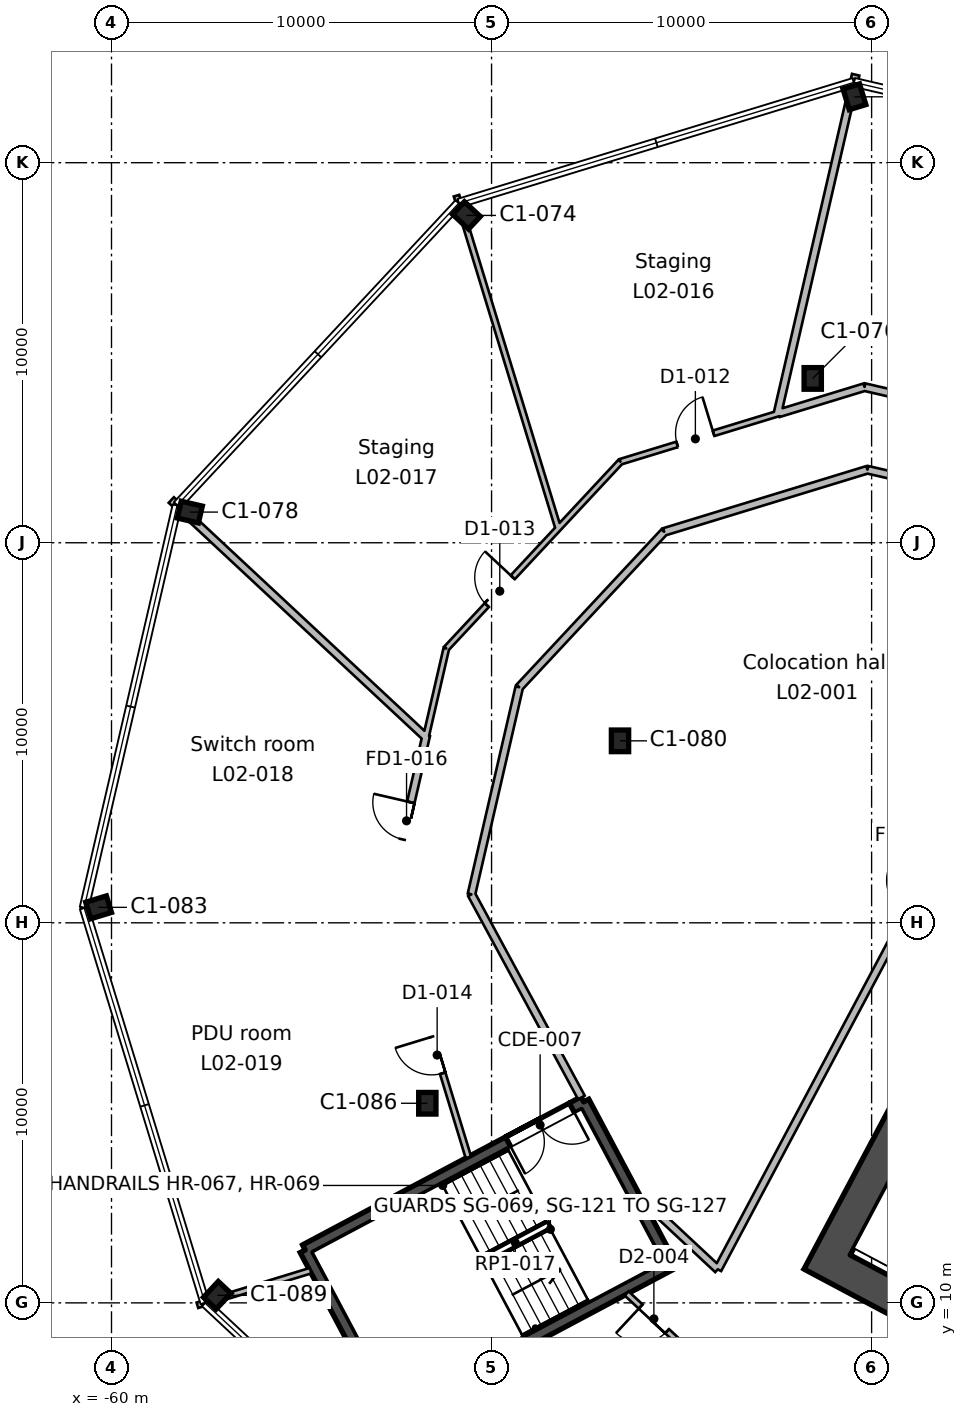
"""IFC4 building model, lengths in metres.
Left out: names, types, materials, properties, quantities, classifications, styles, units other than length and angle.
Written with IfcOpenShell. Run it as: python <this file> out.ifc"""

import sys

from ifc_helpers import new_model, si_unit, direction, frame, frame_2d, origin, origin_2d, place, context, subcontext, project, spatial, rectangle, i_section, extrude, element, fill, save


model = new_model("IFC4")
c1 = context("Model", 3, precision=1e-05, world=origin(), true_north=direction((0.0, 1.0)))
c2 = subcontext(c1, "Body", "Model", "MODEL_VIEW")
j1 = project(units=[si_unit("LENGTHUNIT", "METRE"), si_unit("PLANEANGLEUNIT", "RADIAN")], contexts=[c1])
p1 = place(None, origin())
s1 = spatial("IfcSite", under=j1, at=p1, CompositionType="ELEMENT")
p2 = place(p1, origin())
s2 = spatial("IfcBuilding", under=s1, at=p2, CompositionType="ELEMENT")
p3 = place(p2, frame((0.0, 0.0, 12.2)))
s3 = spatial("IfcBuildingStorey", under=s2, at=p3, CompositionType="ELEMENT", Elevation=12.2)
for number, where, z_axis, x_axis in (
    (1, (-57.219, 10.199, 0.0), (0.0, 0.0, 1.0), (0.731, -0.682, 0.0)),
    (2, (-51.69, 15.252, 0.0), (0.0, 0.0, 1.0), (1.0, 0.0, 0.0)),
    (3, (-60.34, 20.407, 0.0), (0.0, 0.0, 1.0), (0.292, -0.956, 0.0)),
    (4, (-46.62, 24.788, 0.0), (0.0, 0.0, 1.0), (1.0, 0.0, 0.0)),
    (5, (-57.939, 30.807, 0.0), (0.0, 0.0, 1.0), (-0.225, -0.974, 0.0)),
    (6, (-41.549, 34.324, 0.0), (0.0, 0.0, 1.0), (1.0, 0.0, 0.0)),
    (7, (-50.66, 38.613, 0.0), (0.0, 0.0, 1.0), (-0.682, -0.731, 0.0)),
    (8, (-40.452, 41.734, 0.0), (0.0, 0.0, 1.0), (-0.956, -0.292, 0.0)),
):
    element("IfcColumn", number, at=place(p3, frame(where, z_axis=z_axis, x_axis=x_axis)), inside=s3, PredefinedType="COLUMN", context=c2, shape_type="SweptSolid", body=[
        extrude(i_section(OverallWidth=0.455, OverallDepth=0.569, WebThickness=0.078, FlangeThickness=0.125, FilletRadius=0.015, at=origin_2d()), origin(), (0.0, 0.0, 1.0), 5.4),
    ])
p4 = place(p3, frame((-31.992, 28.336, 0.0), z_axis=(0.0, 0.0, 1.0), x_axis=(-0.46947084998, -0.882947971864, 0.0)))
e9 = element("IfcWall", 9, at=p4, inside=s3, PredefinedType="SHEAR", context=c2, shape_type="SweptSolid", body=[
    extrude(rectangle(XDim=20.0, YDim=0.9, at=frame_2d((10.0, 0.0))), origin(), (0.0, 0.0, 1.0), 5.4),
])
p5 = place(p4, frame((10.6, 0.0, 0.0)))
e10 = element("IfcOpeningElement", 10, at=p5, cuts=e9, PredefinedType="OPENING", context=c2, shape_type="SweptSolid", body=[
    extrude(rectangle(XDim=2.4, YDim=2.4, at=frame_2d((1.2, 1.2))), frame((0.0, 0.46, 0.0), z_axis=(0.0, -1.0, 0.0), x_axis=(1.0, 0.0, 0.0)), (0.0, 0.0, 1.0), 0.92),
])
p6 = place(p3, frame((-22.937, 1.38, 0.0), z_axis=(0.0, 0.0, 1.0), x_axis=(-0.88295276571, 0.46946183394, 0.0)))
e11 = element("IfcWall", 11, at=p6, inside=s3, PredefinedType="SHEAR", context=c2, shape_type="SweptSolid", body=[
    extrude(rectangle(XDim=20.2, YDim=0.9, at=frame_2d((10.1, 0.0))), origin(), (0.0, 0.0, 1.0), 5.4),
])
p7 = place(p3, frame((-47.574, 15.29, 0.0), z_axis=(0.0, 0.0, 1.0), x_axis=(0.469443498566, -0.882962514297, 0.0)))
e12 = element("IfcWall", 12, at=p7, inside=s3, PredefinedType="SHEAR", context=c2, shape_type="SweptSolid", body=[
    extrude(rectangle(XDim=4.85, YDim=0.3, at=frame_2d((2.425, 0.0))), origin(), (0.0, 0.0, 1.0), 5.4),
])
p8 = place(p3, frame((-45.297, 11.007, 0.0), z_axis=(0.0, 0.0, 1.0), x_axis=(-0.882951519127, -0.469464178475, 0.0)))
e13 = element("IfcWall", 13, at=p8, inside=s3, PredefinedType="SHEAR", context=c2, shape_type="SweptSolid", body=[
    extrude(rectangle(XDim=8.3, YDim=0.3, at=frame_2d((4.15, 0.0))), origin(), (0.0, 0.0, 1.0), 5.4),
])
p9 = place(p3, frame((-52.626, 7.111, 0.0), z_axis=(0.0, 0.0, 1.0), x_axis=(-0.469464364128, 0.882951420416, 0.0)))
e14 = element("IfcWall", 14, at=p9, inside=s3, PredefinedType="SHEAR", context=c2, shape_type="SweptSolid", body=[
    extrude(rectangle(XDim=4.85, YDim=0.3, at=frame_2d((2.425, 0.0))), origin(), (0.0, 0.0, 1.0), 5.4),
])
p10 = place(p3, frame((-54.903, 11.393, 0.0), z_axis=(0.0, 0.0, 1.0), x_axis=(0.882939326045, 0.469487110071, 0.0)))
e15 = element("IfcWall", 15, at=p10, inside=s3, PredefinedType="SHEAR", context=c2, shape_type="SweptSolid", body=[
    extrude(rectangle(XDim=8.3, YDim=0.3, at=frame_2d((4.15, 0.0))), origin(), (0.0, 0.0, 1.0), 5.4),
])
p11 = place(p10, frame((6.05, 0.0, 0.0)))
e16 = element("IfcOpeningElement", 16, at=p11, cuts=e15, PredefinedType="OPENING", context=c2, shape_type="SweptSolid", body=[
    extrude(rectangle(XDim=1.9, YDim=2.1, at=frame_2d((0.95, 1.05))), frame((0.0, 0.16, 0.0), z_axis=(0.0, -1.0, 0.0), x_axis=(1.0, 0.0, 0.0)), (0.0, 0.0, 1.0), 0.32),
])
p12 = place(p3, frame((-52.0, 18.38, 0.0), z_axis=(0.0, 0.0, 1.0), x_axis=(-0.974364676657, 0.224974391617, 0.0)))
e17 = element("IfcWall", 17, at=p12, inside=s3, PredefinedType="PARTITIONING", context=c2, shape_type="SweptSolid", body=[
    extrude(rectangle(XDim=9.157, YDim=0.2, at=frame_2d((4.578, 0.0))), origin(), (0.0, 0.0, 1.0), 4.95),
])
p13 = place(p3, frame((-58.427, 31.125, 0.0), z_axis=(0.0, 0.0, 1.0), x_axis=(0.731471018411, -0.681872531508, 0.0)))
e18 = element("IfcWall", 18, at=p13, inside=s3, PredefinedType="PARTITIONING", context=c2, shape_type="SweptSolid", body=[
    extrude(rectangle(XDim=9.156, YDim=0.2, at=frame_2d((4.578, 0.0))), origin(), (0.0, 0.0, 1.0), 4.95),
])
p14 = place(p3, frame((-54.761, 10.848, 0.0), z_axis=(0.0, 0.0, 1.0), x_axis=(-0.956301064033, -0.29238378021, 0.0)))
e19 = element("IfcWall", 19, at=p14, inside=s3, PredefinedType="PARTITIONING", context=c2, shape_type="SweptSolid", body=[
    extrude(rectangle(XDim=3.115, YDim=0.15, at=frame_2d((1.558, 0.0))), origin(), (0.0, 0.0, 1.0), 4.95),
])
p15 = place(p3, frame((-51.717, 24.935, 0.0), z_axis=(0.0, 0.0, 1.0), x_axis=(-0.224936958004, -0.974373319074, 0.0)))
e20 = element("IfcWall", 20, at=p15, inside=s3, PredefinedType="PARTITIONING", context=c2, shape_type="SweptSolid", body=[
    extrude(rectangle(XDim=4.374, YDim=0.2, at=frame_2d((2.187, 0.0))), origin(), (0.0, 0.0, 1.0), 4.95),
])
p16 = place(p15, frame((1.811, 0.0, 0.0)))
e21 = element("IfcOpeningElement", 21, at=p16, cuts=e20, PredefinedType="OPENING", context=c2, shape_type="SweptSolid", body=[
    extrude(rectangle(XDim=1.0, YDim=2.1, at=frame_2d((0.5, 1.05))), frame((0.0, 0.11, 0.0), z_axis=(0.0, -1.0, 0.0), x_axis=(1.0, 0.0, 0.0)), (0.0, 0.0, 1.0), 0.22),
])
p17 = place(p3, frame((-52.701, 20.673, 0.0), z_axis=(0.0, 0.0, 1.0), x_axis=(0.292364174208, -0.95630705824, 0.0)))
e22 = element("IfcWall", 22, at=p17, inside=s3, PredefinedType="PARTITIONING", context=c2, shape_type="SweptSolid", body=[
    extrude(rectangle(XDim=2.342, YDim=0.2, at=frame_2d((1.171, 0.0))), origin(), (0.0, 0.0, 1.0), 4.95),
])
p18 = place(p3, frame((-50.61, 13.829, 0.0), z_axis=(0.0, 0.0, 1.0), x_axis=(-0.292136082749, 0.956376761092, 0.0)))
e23 = element("IfcWall", 23, at=p18, inside=s3, PredefinedType="PARTITIONING", context=c2, shape_type="SweptSolid", body=[
    extrude(rectangle(XDim=4.814, YDim=0.15, at=frame_2d((2.407, 0.0))), origin(), (0.0, 0.0, 1.0), 4.95),
])
p19 = place(p18, frame((2.315, 0.0, 0.0)))
e24 = element("IfcOpeningElement", 24, at=p19, cuts=e23, PredefinedType="OPENING", context=c2, shape_type="SweptSolid", body=[
    extrude(rectangle(XDim=1.0, YDim=2.1, at=frame_2d((0.5, 1.05))), frame((0.0, 0.085, 0.0), z_axis=(0.0, -1.0, 0.0), x_axis=(1.0, 0.0, 0.0)), (0.0, 0.0, 1.0), 0.17),
])
p20 = place(p3, frame((-48.207, 30.417, 0.0), z_axis=(0.0, 0.0, 1.0), x_axis=(-0.681976112234, -0.731374447422, 0.0)))
e25 = element("IfcWall", 25, at=p20, inside=s3, PredefinedType="PARTITIONING", context=c2, shape_type="SweptSolid", body=[
    extrude(rectangle(XDim=4.374, YDim=0.15, at=frame_2d((2.187, 0.0))), origin(), (0.0, 0.0, 1.0), 4.95),
])
p21 = place(p20, frame((1.812, 0.0, 0.0)))
e26 = element("IfcOpeningElement", 26, at=p21, cuts=e25, PredefinedType="OPENING", context=c2, shape_type="SweptSolid", body=[
    extrude(rectangle(XDim=1.0, YDim=2.1, at=frame_2d((0.5, 1.05))), frame((0.0, 0.085, 0.0), z_axis=(0.0, -1.0, 0.0), x_axis=(1.0, 0.0, 0.0)), (0.0, 0.0, 1.0), 0.17),
])
p22 = place(p3, frame((-51.19, 27.218, 0.0), z_axis=(0.0, 0.0, 1.0), x_axis=(-0.224966046097, -0.974366603545, 0.0)))
e27 = element("IfcWall", 27, at=p22, inside=s3, PredefinedType="PARTITIONING", context=c2, shape_type="SweptSolid", body=[
    extrude(rectangle(XDim=2.343, YDim=0.15, at=frame_2d((1.171, 0.0))), origin(), (0.0, 0.0, 1.0), 4.95),
])
p23 = place(p3, frame((-50.922, 39.133, 0.0), z_axis=(0.0, 0.0, 1.0), x_axis=(0.292370951465, -0.956304986257, 0.0)))
e28 = element("IfcWall", 28, at=p23, inside=s3, PredefinedType="PARTITIONING", context=c2, shape_type="SweptSolid", body=[
    extrude(rectangle(XDim=9.156, YDim=0.15, at=frame_2d((4.578, 0.0))), origin(), (0.0, 0.0, 1.0), 4.95),
])
p24 = place(p3, frame((-42.449, 33.403, 0.0), z_axis=(0.0, 0.0, 1.0), x_axis=(-0.956294478368, -0.292405319109, 0.0)))
e29 = element("IfcWall", 29, at=p24, inside=s3, PredefinedType="PARTITIONING", context=c2, shape_type="SweptSolid", body=[
    extrude(rectangle(XDim=4.35, YDim=0.15, at=frame_2d((2.175, 0.0))), origin(), (0.0, 0.0, 1.0), 4.95),
])
p25 = place(p24, frame((1.788, 0.0, 0.0)))
e30 = element("IfcOpeningElement", 30, at=p25, cuts=e29, PredefinedType="OPENING", context=c2, shape_type="SweptSolid", body=[
    extrude(rectangle(XDim=1.0, YDim=2.1, at=frame_2d((0.5, 1.05))), frame((0.0, 0.085, 0.0), z_axis=(0.0, -1.0, 0.0), x_axis=(1.0, 0.0, 0.0)), (0.0, 0.0, 1.0), 0.17),
])
p26 = place(p3, frame((-46.609, 32.131, 0.0), z_axis=(0.0, 0.0, 1.0), x_axis=(-0.681932137148, -0.731415449881, 0.0)))
e31 = element("IfcWall", 31, at=p26, inside=s3, PredefinedType="PARTITIONING", context=c2, shape_type="SweptSolid", body=[
    extrude(rectangle(XDim=2.344, YDim=0.15, at=frame_2d((1.172, 0.0))), origin(), (0.0, 0.0, 1.0), 4.95),
])
p27 = place(p3, frame((-47.635, 15.404, 0.0), z_axis=(0.0, 0.0, 1.0), x_axis=(-0.476091616607, 0.879395686024, 0.0)))
e32 = element("IfcWall", 32, at=p27, inside=s3, PredefinedType="PARTITIONING", context=c2, shape_type="SweptSolid", body=[
    extrude(rectangle(XDim=6.078, YDim=0.2, at=frame_2d((3.039, 0.0))), origin(), (0.0, 0.0, 1.0), 4.95),
])
p28 = place(p3, frame((-50.529, 20.749, 0.0), z_axis=(0.0, 0.0, 1.0), x_axis=(0.224961533954, 0.974367645317, 0.0)))
e33 = element("IfcWall", 33, at=p28, inside=s3, PredefinedType="PARTITIONING", context=c2, shape_type="SweptSolid", body=[
    extrude(rectangle(XDim=5.592, YDim=0.2, at=frame_2d((2.796, 0.0))), origin(), (0.0, 0.0, 1.0), 4.95),
])
p29 = place(p3, frame((-49.271, 26.198, 0.0), z_axis=(0.0, 0.0, 1.0), x_axis=(0.682075535217, 0.73128172701, 0.0)))
e34 = element("IfcWall", 34, at=p29, inside=s3, PredefinedType="PARTITIONING", context=c2, shape_type="SweptSolid", body=[
    extrude(rectangle(XDim=5.592, YDim=0.2, at=frame_2d((2.796, 0.0))), origin(), (0.0, 0.0, 1.0), 4.95),
])
p30 = place(p3, frame((-45.457, 30.287, 0.0), z_axis=(0.0, 0.0, 1.0), x_axis=(0.956290198193, 0.292419316803, 0.0)))
e35 = element("IfcWall", 35, at=p30, inside=s3, PredefinedType="PARTITIONING", context=c2, shape_type="SweptSolid", body=[
    extrude(rectangle(XDim=5.591, YDim=0.2, at=frame_2d((2.796, 0.0))), origin(), (0.0, 0.0, 1.0), 4.95),
])
p31 = place(p3, frame((-40.11, 31.922, 0.0), z_axis=(0.0, 0.0, 1.0), x_axis=(0.974361387977, -0.224988634423, 0.0)))
e36 = element("IfcWall", 36, at=p31, inside=s3, PredefinedType="PARTITIONING", context=c2, shape_type="SweptSolid", body=[
    extrude(rectangle(XDim=6.628, YDim=0.2, at=frame_2d((3.314, 0.0))), origin(), (0.0, 0.0, 1.0), 4.95),
])
p32 = place(p3, frame((-33.652, 30.431, 0.0), z_axis=(0.0, 0.0, 1.0), x_axis=(-0.469497028511, -0.882934052021, 0.0)))
e37 = element("IfcWall", 37, at=p32, inside=s3, PredefinedType="PARTITIONING", context=c2, shape_type="SweptSolid", body=[
    extrude(rectangle(XDim=22.141, YDim=0.2, at=frame_2d((11.07, 0.0))), origin(), (0.0, 0.0, 1.0), 4.95),
])
p33 = place(p32, frame((10.55, 0.0, 0.0)))
e38 = element("IfcOpeningElement", 38, at=p33, cuts=e37, PredefinedType="OPENING", context=c2, shape_type="SweptSolid", body=[
    extrude(rectangle(XDim=1.0, YDim=2.1, at=frame_2d((0.5, 1.05))), frame((0.0, 0.11, 0.0), z_axis=(0.0, -1.0, 0.0), x_axis=(1.0, 0.0, 0.0)), (0.0, 0.0, 1.0), 0.22),
])
p34 = place(p3, frame((-44.047, 10.882, 0.0), z_axis=(0.0, 0.0, 1.0), x_axis=(-0.731253434149, 0.682105867916, 0.0)))
e39 = element("IfcWall", 39, at=p34, inside=s3, PredefinedType="PARTITIONING", context=c2, shape_type="SweptSolid", body=[
    extrude(rectangle(XDim=2.663, YDim=0.2, at=frame_2d((1.331, 0.0))), origin(), (0.0, 0.0, 1.0), 4.95),
])
p35 = place(p3, frame((-45.052, 8.948, 0.0), z_axis=(0.0, 0.0, 1.0), x_axis=(-0.731400259701, 0.681948429215, 0.0)))
e40 = element("IfcWall", 40, at=p35, inside=s3, PredefinedType="PARTITIONING", context=c2, shape_type="SweptSolid", body=[
    extrude(rectangle(XDim=1.906, YDim=0.15, at=frame_2d((0.953, 0.0))), origin(), (0.0, 0.0, 1.0), 4.95),
])
p36 = place(p35, frame((0.45, 0.0, 0.0)))
e41 = element("IfcOpeningElement", 41, at=p36, cuts=e40, PredefinedType="OPENING", context=c2, shape_type="SweptSolid", body=[
    extrude(rectangle(XDim=0.95, YDim=2.1, at=frame_2d((0.475, 1.05))), frame((0.0, 0.085, 0.0), z_axis=(0.0, -1.0, 0.0), x_axis=(1.0, 0.0, 0.0)), (0.0, 0.0, 1.0), 0.17),
])
p37 = place(p3, frame((-40.419, 42.315, 0.0), z_axis=(0.0, 0.0, 1.0), x_axis=(-0.225003617867, -0.974357928046, 0.0)))
e42 = element("IfcWall", 42, at=p37, inside=s3, PredefinedType="PARTITIONING", context=c2, shape_type="SweptSolid", body=[
    extrude(rectangle(XDim=9.156, YDim=0.2, at=frame_2d((4.578, 0.0))), origin(), (0.0, 0.0, 1.0), 4.95),
])
p38 = place(p3, frame((-40.185, 34.095, 0.0), z_axis=(0.0, 0.0, 1.0), x_axis=(-0.956334756987, -0.292273557781, 0.0)))
e43 = element("IfcWall", 43, at=p38, inside=s3, PredefinedType="PARTITIONING", context=c2, shape_type="SweptSolid", body=[
    extrude(rectangle(XDim=2.367, YDim=0.2, at=frame_2d((1.184, 0.0))), origin(), (0.0, 0.0, 1.0), 4.95),
])
p39 = place(p3, frame((-40.186, 34.095, 0.0), z_axis=(0.0, 0.0, 1.0), x_axis=(0.974351478487, -0.225031545278, 0.0)))
e44 = element("IfcWall", 44, at=p39, inside=s3, PredefinedType="PARTITIONING", context=c2, shape_type="SweptSolid", body=[
    extrude(rectangle(XDim=5.493, YDim=0.2, at=frame_2d((2.747, 0.0))), origin(), (0.0, 0.0, 1.0), 4.95),
])
p40 = place(p39, frame((2.25, 0.0, 0.0)))
e45 = element("IfcOpeningElement", 45, at=p40, cuts=e44, PredefinedType="OPENING", context=c2, shape_type="SweptSolid", body=[
    extrude(rectangle(XDim=1.0, YDim=2.1, at=frame_2d((0.5, 1.05))), frame((0.0, 0.11, 0.0), z_axis=(0.0, -1.0, 0.0), x_axis=(1.0, 0.0, 0.0)), (0.0, 0.0, 1.0), 0.22),
])
p41 = place(p11, frame((1.9, 0.0, 0.0), z_axis=(0.0, 0.0, 1.0), x_axis=(-1.0, 0.0, 0.0)))
e46 = element("IfcDoor", 46, at=p41, inside=s3, OperationType="DOUBLE_DOOR_SINGLE_SWING", PredefinedType="DOOR", context=c2, shape_type="SweptSolid", body=[
    extrude(rectangle(XDim=1.9, YDim=2.1, at=frame_2d((0.95, 1.05))), frame((0.0, 0.025, 0.0), z_axis=(0.0, -1.0, 0.0), x_axis=(1.0, 0.0, 0.0)), (0.0, 0.0, 1.0), 0.05),
])
fill(e16, e46)
p42 = place(p25, frame((1.0, 0.0, 0.0), z_axis=(0.0, 0.0, 1.0), x_axis=(-1.0, 0.0, 0.0)))
e47 = element("IfcDoor", 47, at=p42, inside=s3, OperationType="SINGLE_SWING_RIGHT", PredefinedType="DOOR", context=c2, shape_type="SweptSolid", body=[
    extrude(rectangle(XDim=1.0, YDim=2.1, at=frame_2d((0.5, 1.05))), frame((0.0, 0.025, 0.0), z_axis=(0.0, -1.0, 0.0), x_axis=(1.0, 0.0, 0.0)), (0.0, 0.0, 1.0), 0.05),
])
fill(e30, e47)
p43 = place(p21, frame((1.0, 0.0, 0.0), z_axis=(0.0, 0.0, 1.0), x_axis=(-1.0, 0.0, 0.0)))
e48 = element("IfcDoor", 48, at=p43, inside=s3, OperationType="SINGLE_SWING_RIGHT", PredefinedType="DOOR", context=c2, shape_type="SweptSolid", body=[
    extrude(rectangle(XDim=1.0, YDim=2.1, at=frame_2d((0.5, 1.05))), frame((0.0, 0.025, 0.0), z_axis=(0.0, -1.0, 0.0), x_axis=(1.0, 0.0, 0.0)), (0.0, 0.0, 1.0), 0.05),
])
fill(e26, e48)
p44 = place(p16, frame((1.0, 0.0, 0.0), z_axis=(0.0, 0.0, 1.0), x_axis=(-1.0, 0.0, 0.0)))
e49 = element("IfcDoor", 49, at=p44, inside=s3, OperationType="SINGLE_SWING_RIGHT", PredefinedType="DOOR", context=c2, shape_type="SweptSolid", body=[
    extrude(rectangle(XDim=1.0, YDim=2.1, at=frame_2d((0.5, 1.05))), frame((0.0, 0.025, 0.0), z_axis=(0.0, -1.0, 0.0), x_axis=(1.0, 0.0, 0.0)), (0.0, 0.0, 1.0), 0.05),
])
fill(e21, e49)
p45 = place(p19, origin())
e50 = element("IfcDoor", 50, at=p45, inside=s3, OperationType="SINGLE_SWING_RIGHT", PredefinedType="DOOR", context=c2, shape_type="SweptSolid", body=[
    extrude(rectangle(XDim=1.0, YDim=2.1, at=frame_2d((0.5, 1.05))), frame((0.0, 0.025, 0.0), z_axis=(0.0, -1.0, 0.0), x_axis=(1.0, 0.0, 0.0)), (0.0, 0.0, 1.0), 0.05),
])
fill(e24, e50)
p46 = place(p36, origin())
e51 = element("IfcDoor", 51, at=p46, inside=s3, OperationType="SINGLE_SWING_RIGHT", PredefinedType="DOOR", context=c2, shape_type="SweptSolid", body=[
    extrude(rectangle(XDim=0.95, YDim=2.1, at=frame_2d((0.475, 1.05))), frame((0.0, 0.025, 0.0), z_axis=(0.0, -1.0, 0.0), x_axis=(1.0, 0.0, 0.0)), (0.0, 0.0, 1.0), 0.05),
])
fill(e41, e51)
save(model, sys.argv[1])
